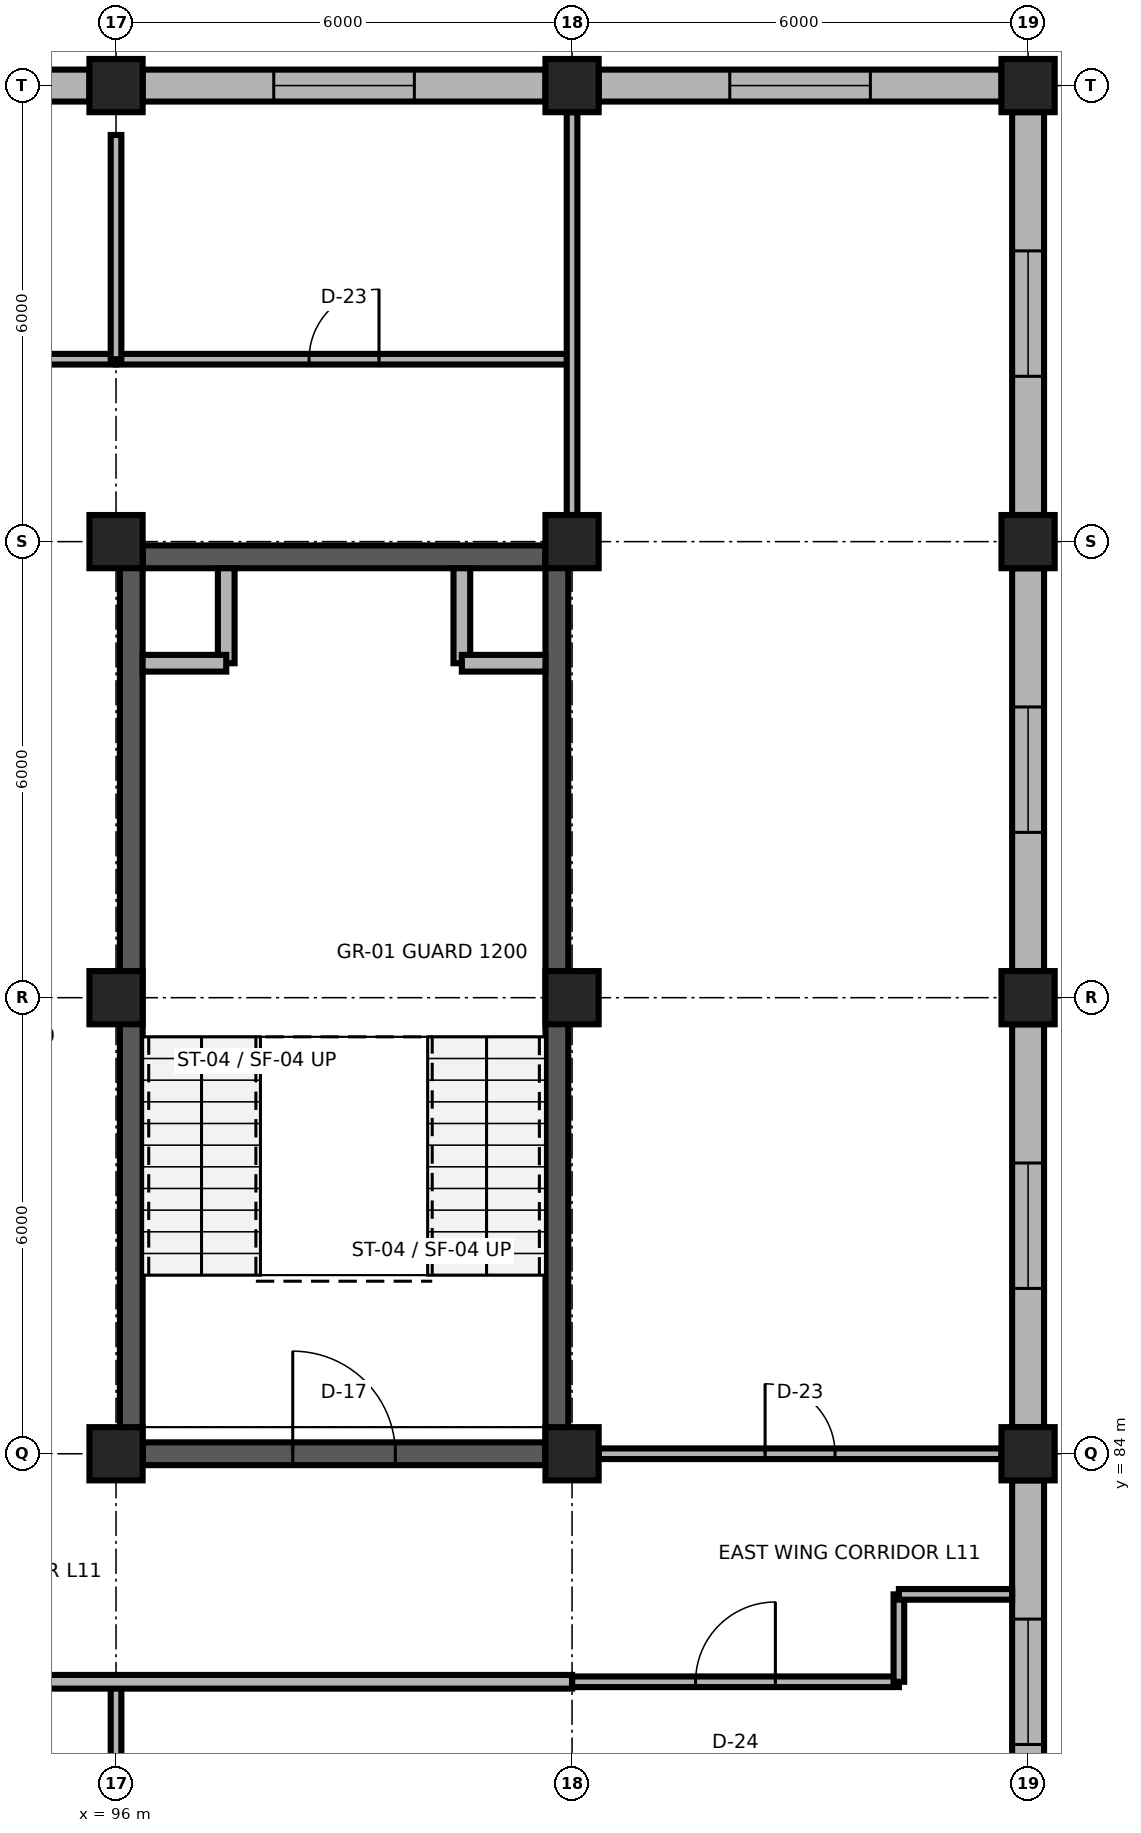
"""IFC4 building model, lengths in metres.
Left out: names, types, materials, properties, quantities, classifications, styles, units other than length and angle.
Written with IfcOpenShell. Run it as: python <this file> out.ifc"""

import sys

from ifc_helpers import new_model, si_unit, direction, frame, frame_2d, origin, origin_2d, place, context, subcontext, project, spatial, rectangle, extrude, element, fill, save


model = new_model("IFC4")
c1 = context("Model", 3, precision=1e-05, world=origin(), true_north=direction((0.0, 1.0)))
c2 = subcontext(c1, "Body", "Model", "MODEL_VIEW")
j1 = project(units=[si_unit("LENGTHUNIT", "METRE"), si_unit("PLANEANGLEUNIT", "RADIAN")], contexts=[c1])
p1 = place(None, origin())
s1 = spatial("IfcSite", under=j1, at=p1, CompositionType="ELEMENT")
p2 = place(p1, origin())
s2 = spatial("IfcBuilding", under=s1, at=p2, CompositionType="ELEMENT")
p3 = place(p2, frame((0.0, 0.0, 44.4)))
s3 = spatial("IfcBuildingStorey", under=s2, at=p3, CompositionType="ELEMENT", Elevation=44.4)
for number, where, z_axis, x_axis in (
    (1, (96.0, 84.0, 0.0), (0.0, 0.0, 1.0), (1.0, 0.0, 0.0)),
    (2, (102.0, 84.0, 0.0), (0.0, 0.0, 1.0), (1.0, 0.0, 0.0)),
    (3, (108.0, 84.0, 0.0), (0.0, 0.0, 1.0), (1.0, 0.0, 0.0)),
    (4, (96.0, 90.0, 0.0), (0.0, 0.0, 1.0), (1.0, 0.0, 0.0)),
    (5, (102.0, 90.0, 0.0), (0.0, 0.0, 1.0), (1.0, 0.0, 0.0)),
    (6, (108.0, 90.0, 0.0), (0.0, 0.0, 1.0), (1.0, 0.0, 0.0)),
    (7, (96.0, 96.0, 0.0), (0.0, 0.0, 1.0), (1.0, 0.0, 0.0)),
    (8, (102.0, 96.0, 0.0), (0.0, 0.0, 1.0), (1.0, 0.0, 0.0)),
    (9, (108.0, 96.0, 0.0), (0.0, 0.0, 1.0), (1.0, 0.0, 0.0)),
    (10, (96.0, 102.0, 0.0), (0.0, 0.0, 1.0), (1.0, 0.0, 0.0)),
    (11, (102.0, 102.0, 0.0), (0.0, 0.0, 1.0), (1.0, 0.0, 0.0)),
    (12, (108.0, 102.0, 0.0), (0.0, 0.0, 1.0), (1.0, 0.0, 0.0)),
):
    element("IfcColumn", number, at=place(p3, frame(where, z_axis=z_axis, x_axis=x_axis)), inside=s3, PredefinedType="COLUMN", context=c2, shape_type="SweptSolid", body=[
        extrude(rectangle(XDim=0.7, YDim=0.7, at=origin_2d()), origin(), (0.0, 0.0, 1.0), 3.9),
    ])
p4 = place(p3, frame((90.35, 102.0, 0.0), z_axis=(0.0, 0.0, 1.0), x_axis=(1.0, 0.0, 0.0)))
e13 = element("IfcWall", 13, at=p4, inside=s3, PredefinedType="SOLIDWALL", context=c2, shape_type="SweptSolid", body=[
    extrude(rectangle(XDim=5.3, YDim=0.42, at=frame_2d((2.65, 0.0))), origin(), (0.0, 0.0, 1.0), 3.32),
])
p5 = place(p4, frame((1.725, 0.0, 0.85)))
e14 = element("IfcOpeningElement", 14, at=p5, cuts=e13, PredefinedType="OPENING", context=c2, shape_type="SweptSolid", body=[
    extrude(rectangle(XDim=1.85, YDim=2.0, at=frame_2d((0.925, 1.0))), frame((0.0, 0.225, 0.0), z_axis=(0.0, -1.0, 0.0), x_axis=(1.0, 0.0, 0.0)), (0.0, 0.0, 1.0), 0.45),
])
p6 = place(p3, frame((96.35, 102.0, 0.0), z_axis=(0.0, 0.0, 1.0), x_axis=(1.0, 0.0, 0.0)))
e15 = element("IfcWall", 15, at=p6, inside=s3, PredefinedType="SOLIDWALL", context=c2, shape_type="SweptSolid", body=[
    extrude(rectangle(XDim=5.3, YDim=0.42, at=frame_2d((2.65, 0.0))), origin(), (0.0, 0.0, 1.0), 3.32),
])
p7 = place(p6, frame((1.725, 0.0, 0.85)))
e16 = element("IfcOpeningElement", 16, at=p7, cuts=e15, PredefinedType="OPENING", context=c2, shape_type="SweptSolid", body=[
    extrude(rectangle(XDim=1.85, YDim=2.0, at=frame_2d((0.925, 1.0))), frame((0.0, 0.225, 0.0), z_axis=(0.0, -1.0, 0.0), x_axis=(1.0, 0.0, 0.0)), (0.0, 0.0, 1.0), 0.45),
])
p8 = place(p3, frame((102.35, 102.0, 0.0), z_axis=(0.0, 0.0, 1.0), x_axis=(1.0, 0.0, 0.0)))
e17 = element("IfcWall", 17, at=p8, inside=s3, PredefinedType="SOLIDWALL", context=c2, shape_type="SweptSolid", body=[
    extrude(rectangle(XDim=5.3, YDim=0.42, at=frame_2d((2.65, 0.0))), origin(), (0.0, 0.0, 1.0), 3.32),
])
p9 = place(p8, frame((1.725, 0.0, 0.85)))
e18 = element("IfcOpeningElement", 18, at=p9, cuts=e17, PredefinedType="OPENING", context=c2, shape_type="SweptSolid", body=[
    extrude(rectangle(XDim=1.85, YDim=2.0, at=frame_2d((0.925, 1.0))), frame((0.0, 0.225, 0.0), z_axis=(0.0, -1.0, 0.0), x_axis=(1.0, 0.0, 0.0)), (0.0, 0.0, 1.0), 0.45),
])
p10 = place(p3, frame((108.0, 78.35, 0.0), z_axis=(0.0, 0.0, 1.0), x_axis=(0.0, 1.0, 0.0)))
e19 = element("IfcWall", 19, at=p10, inside=s3, PredefinedType="SOLIDWALL", context=c2, shape_type="SweptSolid", body=[
    extrude(rectangle(XDim=5.3, YDim=0.42, at=frame_2d((2.65, 0.0))), origin(), (0.0, 0.0, 1.0), 3.32),
])
p11 = place(p10, frame((1.825, 0.0, 0.85)))
e20 = element("IfcOpeningElement", 20, at=p11, cuts=e19, PredefinedType="OPENING", context=c2, shape_type="SweptSolid", body=[
    extrude(rectangle(XDim=1.65, YDim=1.95, at=frame_2d((0.825, 0.975))), frame((0.0, 0.225, 0.0), z_axis=(0.0, -1.0, 0.0), x_axis=(1.0, 0.0, 0.0)), (0.0, 0.0, 1.0), 0.45),
])
p12 = place(p3, frame((108.0, 84.35, 0.0), z_axis=(0.0, 0.0, 1.0), x_axis=(0.0, 1.0, 0.0)))
e21 = element("IfcWall", 21, at=p12, inside=s3, PredefinedType="SOLIDWALL", context=c2, shape_type="SweptSolid", body=[
    extrude(rectangle(XDim=5.3, YDim=0.42, at=frame_2d((2.65, 0.0))), origin(), (0.0, 0.0, 1.0), 3.32),
])
p13 = place(p12, frame((1.825, 0.0, 0.85)))
e22 = element("IfcOpeningElement", 22, at=p13, cuts=e21, PredefinedType="OPENING", context=c2, shape_type="SweptSolid", body=[
    extrude(rectangle(XDim=1.65, YDim=1.95, at=frame_2d((0.825, 0.975))), frame((0.0, 0.225, 0.0), z_axis=(0.0, -1.0, 0.0), x_axis=(1.0, 0.0, 0.0)), (0.0, 0.0, 1.0), 0.45),
])
p14 = place(p3, frame((108.0, 90.35, 0.0), z_axis=(0.0, 0.0, 1.0), x_axis=(0.0, 1.0, 0.0)))
e23 = element("IfcWall", 23, at=p14, inside=s3, PredefinedType="SOLIDWALL", context=c2, shape_type="SweptSolid", body=[
    extrude(rectangle(XDim=5.3, YDim=0.42, at=frame_2d((2.65, 0.0))), origin(), (0.0, 0.0, 1.0), 3.32),
])
p15 = place(p14, frame((1.825, 0.0, 0.85)))
e24 = element("IfcOpeningElement", 24, at=p15, cuts=e23, PredefinedType="OPENING", context=c2, shape_type="SweptSolid", body=[
    extrude(rectangle(XDim=1.65, YDim=1.95, at=frame_2d((0.825, 0.975))), frame((0.0, 0.225, 0.0), z_axis=(0.0, -1.0, 0.0), x_axis=(1.0, 0.0, 0.0)), (0.0, 0.0, 1.0), 0.45),
])
p16 = place(p3, frame((108.0, 96.35, 0.0), z_axis=(0.0, 0.0, 1.0), x_axis=(0.0, 1.0, 0.0)))
e25 = element("IfcWall", 25, at=p16, inside=s3, PredefinedType="SOLIDWALL", context=c2, shape_type="SweptSolid", body=[
    extrude(rectangle(XDim=5.3, YDim=0.42, at=frame_2d((2.65, 0.0))), origin(), (0.0, 0.0, 1.0), 3.32),
])
p17 = place(p16, frame((1.825, 0.0, 0.85)))
e26 = element("IfcOpeningElement", 26, at=p17, cuts=e25, PredefinedType="OPENING", context=c2, shape_type="SweptSolid", body=[
    extrude(rectangle(XDim=1.65, YDim=1.95, at=frame_2d((0.825, 0.975))), frame((0.0, 0.225, 0.0), z_axis=(0.0, -1.0, 0.0), x_axis=(1.0, 0.0, 0.0)), (0.0, 0.0, 1.0), 0.45),
])
p18 = place(p3, frame((96.35, 84.0, 0.0), z_axis=(0.0, 0.0, 1.0), x_axis=(1.0, 0.0, 0.0)))
e27 = element("IfcWall", 27, at=p18, inside=s3, PredefinedType="SHEAR", context=c2, shape_type="SweptSolid", body=[
    extrude(rectangle(XDim=5.3, YDim=0.3, at=frame_2d((2.65, 0.0))), origin(), (0.0, 0.0, 1.0), 3.66),
])
p19 = place(p18, frame((1.975, 0.0, 0.0)))
e28 = element("IfcOpeningElement", 28, at=p19, cuts=e27, PredefinedType="OPENING", context=c2, shape_type="SweptSolid", body=[
    extrude(rectangle(XDim=1.35, YDim=2.2, at=frame_2d((0.675, 1.1))), frame((0.0, 0.165, 0.0), z_axis=(0.0, -1.0, 0.0), x_axis=(1.0, 0.0, 0.0)), (0.0, 0.0, 1.0), 0.33),
])
p20 = place(p3, frame((96.35, 95.8, 0.0), z_axis=(0.0, 0.0, 1.0), x_axis=(1.0, 0.0, 0.0)))
e29 = element("IfcWall", 29, at=p20, inside=s3, PredefinedType="SHEAR", context=c2, shape_type="SweptSolid", body=[
    extrude(rectangle(XDim=5.3, YDim=0.3, at=frame_2d((2.65, 0.0))), origin(), (0.0, 0.0, 1.0), 3.74),
])
for number, where, z_axis, x_axis in (
    (30, (96.2, 84.0, 0.0), (0.0, 0.0, 1.0), (0.0, 1.0, 0.0)),
    (31, (101.8, 84.0, 0.0), (0.0, 0.0, 1.0), (0.0, 1.0, 0.0)),
):
    element("IfcWall", number, at=place(p3, frame(where, z_axis=z_axis, x_axis=x_axis)), inside=s3, PredefinedType="SHEAR", context=c2, shape_type="SweptSolid", body=[
        extrude(rectangle(XDim=11.8, YDim=0.3, at=frame_2d((5.9, 0.0))), origin(), (0.0, 0.0, 1.0), 3.74),
    ])
p21 = place(p3, frame((97.45, 94.4, 0.0), z_axis=(0.0, 0.0, 1.0), x_axis=(0.0, 1.0, 0.0)))
e32 = element("IfcWall", 32, at=p21, inside=s3, PredefinedType="PARTITIONING", context=c2, shape_type="SweptSolid", body=[
    extrude(rectangle(XDim=1.25, YDim=0.22, at=frame_2d((0.625, 0.0))), origin(), (0.0, 0.0, 1.0), 3.74),
])
p22 = place(p3, frame((96.35, 94.4, 0.0), z_axis=(0.0, 0.0, 1.0), x_axis=(1.0, 0.0, 0.0)))
e33 = element("IfcWall", 33, at=p22, inside=s3, PredefinedType="PARTITIONING", context=c2, shape_type="SweptSolid", body=[
    extrude(rectangle(XDim=1.1, YDim=0.22, at=frame_2d((0.55, 0.0))), origin(), (0.0, 0.0, 1.0), 3.74),
])
p23 = place(p3, frame((100.55, 94.4, 0.0), z_axis=(0.0, 0.0, 1.0), x_axis=(0.0, 1.0, 0.0)))
e34 = element("IfcWall", 34, at=p23, inside=s3, PredefinedType="PARTITIONING", context=c2, shape_type="SweptSolid", body=[
    extrude(rectangle(XDim=1.25, YDim=0.22, at=frame_2d((0.625, 0.0))), origin(), (0.0, 0.0, 1.0), 3.74),
])
p24 = place(p3, frame((100.55, 94.4, 0.0), z_axis=(0.0, 0.0, 1.0), x_axis=(1.0, 0.0, 0.0)))
e35 = element("IfcWall", 35, at=p24, inside=s3, PredefinedType="PARTITIONING", context=c2, shape_type="SweptSolid", body=[
    extrude(rectangle(XDim=1.1, YDim=0.22, at=frame_2d((0.55, 0.0))), origin(), (0.0, 0.0, 1.0), 3.74),
])
p25 = place(p3, frame((102.0, 81.0, 0.0), z_axis=(0.0, 0.0, 1.0), x_axis=(1.0, 0.0, 0.0)))
e36 = element("IfcWall", 36, at=p25, inside=s3, PredefinedType="PARTITIONING", context=c2, shape_type="SweptSolid", body=[
    extrude(rectangle(XDim=4.3, YDim=0.14, at=frame_2d((2.15, 0.0))), origin(), (0.0, 0.0, 1.0), 3.74),
])
p26 = place(p25, frame((1.625, 0.0, 0.0)))
e37 = element("IfcOpeningElement", 37, at=p26, cuts=e36, PredefinedType="OPENING", context=c2, shape_type="SweptSolid", body=[
    extrude(rectangle(XDim=1.05, YDim=2.25, at=frame_2d((0.525, 1.125))), frame((0.0, 0.085, 0.0), z_axis=(0.0, -1.0, 0.0), x_axis=(1.0, 0.0, 0.0)), (0.0, 0.0, 1.0), 0.17),
])
p27 = place(p3, frame((102.35, 84.0, 0.0), z_axis=(0.0, 0.0, 1.0), x_axis=(1.0, 0.0, 0.0)))
e38 = element("IfcWall", 38, at=p27, inside=s3, PredefinedType="PARTITIONING", context=c2, shape_type="SweptSolid", body=[
    extrude(rectangle(XDim=5.3, YDim=0.14, at=frame_2d((2.65, 0.0))), origin(), (0.0, 0.0, 1.0), 3.348),
])
p28 = place(p27, frame((2.19, 0.0, 0.0)))
e39 = element("IfcOpeningElement", 39, at=p28, cuts=e38, PredefinedType="OPENING", context=c2, shape_type="SweptSolid", body=[
    extrude(rectangle(XDim=0.92, YDim=2.15, at=frame_2d((0.46, 1.075))), frame((0.0, 0.085, 0.0), z_axis=(0.0, -1.0, 0.0), x_axis=(1.0, 0.0, 0.0)), (0.0, 0.0, 1.0), 0.17),
])
p29 = place(p3, frame((90.0, 98.4, 0.0), z_axis=(0.0, 0.0, 1.0), x_axis=(1.0, 0.0, 0.0)))
e40 = element("IfcWall", 40, at=p29, inside=s3, PredefinedType="PARTITIONING", context=c2, shape_type="SweptSolid", body=[
    extrude(rectangle(XDim=6.0, YDim=0.14, at=frame_2d((3.0, 0.0))), origin(), (0.0, 0.0, 1.0), 3.74),
])
p30 = place(p29, frame((2.54, 0.0, 0.0)))
e41 = element("IfcOpeningElement", 41, at=p30, cuts=e40, PredefinedType="OPENING", context=c2, shape_type="SweptSolid", body=[
    extrude(rectangle(XDim=0.92, YDim=2.15, at=frame_2d((0.46, 1.075))), frame((0.0, 0.085, 0.0), z_axis=(0.0, -1.0, 0.0), x_axis=(1.0, 0.0, 0.0)), (0.0, 0.0, 1.0), 0.17),
])
p31 = place(p3, frame((96.0, 98.4, 0.0), z_axis=(0.0, 0.0, 1.0), x_axis=(1.0, 0.0, 0.0)))
e42 = element("IfcWall", 42, at=p31, inside=s3, PredefinedType="PARTITIONING", context=c2, shape_type="SweptSolid", body=[
    extrude(rectangle(XDim=6.0, YDim=0.14, at=frame_2d((3.0, 0.0))), origin(), (0.0, 0.0, 1.0), 3.74),
])
p32 = place(p31, frame((2.54, 0.0, 0.0)))
e43 = element("IfcOpeningElement", 43, at=p32, cuts=e42, PredefinedType="OPENING", context=c2, shape_type="SweptSolid", body=[
    extrude(rectangle(XDim=0.92, YDim=2.15, at=frame_2d((0.46, 1.075))), frame((0.0, 0.085, 0.0), z_axis=(0.0, -1.0, 0.0), x_axis=(1.0, 0.0, 0.0)), (0.0, 0.0, 1.0), 0.17),
])
p33 = place(p3, frame((96.0, 72.65, 0.0), z_axis=(0.0, 0.0, 1.0), x_axis=(0.0, 1.0, 0.0)))
e44 = element("IfcWall", 44, at=p33, inside=s3, PredefinedType="PARTITIONING", context=c2, shape_type="SweptSolid", body=[
    extrude(rectangle(XDim=8.35, YDim=0.14, at=frame_2d((4.175, 0.0))), origin(), (0.0, 0.0, 1.0), 3.348),
])
p34 = place(p3, frame((96.0, 98.4, 0.0), z_axis=(0.0, 0.0, 1.0), x_axis=(0.0, 1.0, 0.0)))
e45 = element("IfcWall", 45, at=p34, inside=s3, PredefinedType="PARTITIONING", context=c2, shape_type="SweptSolid", body=[
    extrude(rectangle(XDim=2.95, YDim=0.14, at=frame_2d((1.475, 0.0))), origin(), (0.0, 0.0, 1.0), 3.348),
])
p35 = place(p3, frame((90.0, 81.0, 0.0), z_axis=(0.0, 0.0, 1.0), x_axis=(1.0, 0.0, 0.0)))
e46 = element("IfcWall", 46, at=p35, inside=s3, PredefinedType="PARTITIONING", context=c2, shape_type="SweptSolid", body=[
    extrude(rectangle(XDim=12.0, YDim=0.18, at=frame_2d((6.0, 0.0))), origin(), (0.0, 0.0, 1.0), 3.74),
])
p36 = place(p3, frame((106.3, 81.0, 0.0), z_axis=(0.0, 0.0, 1.0), x_axis=(0.0, 1.0, 0.0)))
e47 = element("IfcWall", 47, at=p36, inside=s3, PredefinedType="PARTITIONING", context=c2, shape_type="SweptSolid", body=[
    extrude(rectangle(XDim=1.15, YDim=0.14, at=frame_2d((0.575, 0.0))), origin(), (0.0, 0.0, 1.0), 3.74),
])
p37 = place(p3, frame((106.3, 82.15, 0.0), z_axis=(0.0, 0.0, 1.0), x_axis=(1.0, 0.0, 0.0)))
e48 = element("IfcWall", 48, at=p37, inside=s3, PredefinedType="PARTITIONING", context=c2, shape_type="SweptSolid", body=[
    extrude(rectangle(XDim=1.49, YDim=0.14, at=frame_2d((0.745, 0.0))), origin(), (0.0, 0.0, 1.0), 3.74),
])
p38 = place(p3, frame((102.0, 96.35, 0.0), z_axis=(0.0, 0.0, 1.0), x_axis=(0.0, 1.0, 0.0)))
e49 = element("IfcWall", 49, at=p38, inside=s3, PredefinedType="PARTITIONING", context=c2, shape_type="SweptSolid", body=[
    extrude(rectangle(XDim=5.3, YDim=0.14, at=frame_2d((2.65, 0.0))), origin(), (0.0, 0.0, 1.0), 3.348),
])
p39 = place(p7, origin())
e50 = element("IfcWindow", 50, at=p39, inside=s3, PartitioningType="SINGLE_PANEL", PredefinedType="WINDOW", context=c2, shape_type="SweptSolid", body=[
    extrude(rectangle(XDim=1.85, YDim=2.0, at=frame_2d((0.925, 1.0))), frame((0.0, 0.03, 0.0), z_axis=(0.0, -1.0, 0.0), x_axis=(1.0, 0.0, 0.0)), (0.0, 0.0, 1.0), 0.06),
])
fill(e16, e50)
p40 = place(p9, origin())
e51 = element("IfcWindow", 51, at=p40, inside=s3, PartitioningType="SINGLE_PANEL", PredefinedType="WINDOW", context=c2, shape_type="SweptSolid", body=[
    extrude(rectangle(XDim=1.85, YDim=2.0, at=frame_2d((0.925, 1.0))), frame((0.0, 0.03, 0.0), z_axis=(0.0, -1.0, 0.0), x_axis=(1.0, 0.0, 0.0)), (0.0, 0.0, 1.0), 0.06),
])
fill(e18, e51)
p41 = place(p11, origin())
e52 = element("IfcWindow", 52, at=p41, inside=s3, PartitioningType="SINGLE_PANEL", PredefinedType="WINDOW", context=c2, shape_type="SweptSolid", body=[
    extrude(rectangle(XDim=1.65, YDim=1.95, at=frame_2d((0.825, 0.975))), frame((0.0, 0.03, 0.0), z_axis=(0.0, -1.0, 0.0), x_axis=(1.0, 0.0, 0.0)), (0.0, 0.0, 1.0), 0.06),
])
fill(e20, e52)
p42 = place(p13, origin())
e53 = element("IfcWindow", 53, at=p42, inside=s3, PartitioningType="SINGLE_PANEL", PredefinedType="WINDOW", context=c2, shape_type="SweptSolid", body=[
    extrude(rectangle(XDim=1.65, YDim=1.95, at=frame_2d((0.825, 0.975))), frame((0.0, 0.03, 0.0), z_axis=(0.0, -1.0, 0.0), x_axis=(1.0, 0.0, 0.0)), (0.0, 0.0, 1.0), 0.06),
])
fill(e22, e53)
p43 = place(p15, origin())
e54 = element("IfcWindow", 54, at=p43, inside=s3, PartitioningType="SINGLE_PANEL", PredefinedType="WINDOW", context=c2, shape_type="SweptSolid", body=[
    extrude(rectangle(XDim=1.65, YDim=1.95, at=frame_2d((0.825, 0.975))), frame((0.0, 0.03, 0.0), z_axis=(0.0, -1.0, 0.0), x_axis=(1.0, 0.0, 0.0)), (0.0, 0.0, 1.0), 0.06),
])
fill(e24, e54)
p44 = place(p17, origin())
e55 = element("IfcWindow", 55, at=p44, inside=s3, PartitioningType="SINGLE_PANEL", PredefinedType="WINDOW", context=c2, shape_type="SweptSolid", body=[
    extrude(rectangle(XDim=1.65, YDim=1.95, at=frame_2d((0.825, 0.975))), frame((0.0, 0.03, 0.0), z_axis=(0.0, -1.0, 0.0), x_axis=(1.0, 0.0, 0.0)), (0.0, 0.0, 1.0), 0.06),
])
fill(e26, e55)
p45 = place(p19, origin())
e56 = element("IfcDoor", 56, at=p45, inside=s3, OperationType="SINGLE_SWING_LEFT", PredefinedType="DOOR", context=c2, shape_type="SweptSolid", body=[
    extrude(rectangle(XDim=1.35, YDim=2.2, at=frame_2d((0.675, 1.1))), frame((0.0, 0.025, 0.0), z_axis=(0.0, -1.0, 0.0), x_axis=(1.0, 0.0, 0.0)), (0.0, 0.0, 1.0), 0.05),
])
fill(e28, e56)
p46 = place(p26, origin())
e57 = element("IfcDoor", 57, at=p46, inside=s3, OperationType="SINGLE_SWING_RIGHT", PredefinedType="DOOR", context=c2, shape_type="SweptSolid", body=[
    extrude(rectangle(XDim=1.05, YDim=2.25, at=frame_2d((0.525, 1.125))), frame((0.0, 0.025, 0.0), z_axis=(0.0, -1.0, 0.0), x_axis=(1.0, 0.0, 0.0)), (0.0, 0.0, 1.0), 0.05),
])
fill(e37, e57)
p47 = place(p28, origin())
e58 = element("IfcDoor", 58, at=p47, inside=s3, OperationType="SINGLE_SWING_LEFT", PredefinedType="DOOR", context=c2, shape_type="SweptSolid", body=[
    extrude(rectangle(XDim=0.92, YDim=2.15, at=frame_2d((0.46, 1.075))), frame((0.0, 0.025, 0.0), z_axis=(0.0, -1.0, 0.0), x_axis=(1.0, 0.0, 0.0)), (0.0, 0.0, 1.0), 0.05),
])
fill(e39, e58)
p48 = place(p32, origin())
e59 = element("IfcDoor", 59, at=p48, inside=s3, OperationType="SINGLE_SWING_RIGHT", PredefinedType="DOOR", context=c2, shape_type="SweptSolid", body=[
    extrude(rectangle(XDim=0.92, YDim=2.15, at=frame_2d((0.46, 1.075))), frame((0.0, 0.025, 0.0), z_axis=(0.0, -1.0, 0.0), x_axis=(1.0, 0.0, 0.0)), (0.0, 0.0, 1.0), 0.05),
])
fill(e43, e59)
save(model, sys.argv[1])
